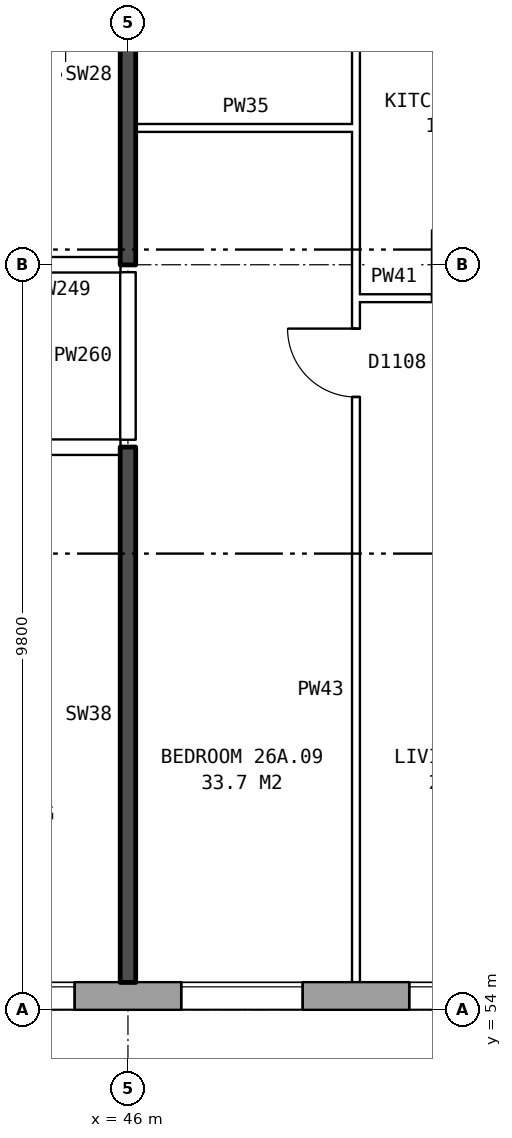
"""IFC4 building model, lengths in metres.
Left out: names, types, materials, properties, quantities, classifications, styles, units other than length and angle.
Written with IfcOpenShell. Run it as: python <this file> out.ifc"""

import sys

from ifc_helpers import new_model, si_unit, direction, frame, frame_2d, origin, place, context, subcontext, project, spatial, rectangle, extrude, element, fill, save


model = new_model("IFC4")
c1 = context("Model", 3, precision=1e-05, world=origin(), true_north=direction((0.0, 1.0)))
c2 = subcontext(c1, "Body", "Model", "MODEL_VIEW")
j1 = project(units=[si_unit("LENGTHUNIT", "METRE"), si_unit("PLANEANGLEUNIT", "RADIAN")], contexts=[c1])
p1 = place(None, origin())
s1 = spatial("IfcSite", under=j1, at=p1, CompositionType="ELEMENT")
p2 = place(p1, origin())
s2 = spatial("IfcBuilding", under=s1, at=p2, CompositionType="ELEMENT")
p3 = place(p2, frame((0.0, 0.0, 96.4)))
s3 = spatial("IfcBuildingStorey", under=s2, at=p3, CompositionType="ELEMENT", Elevation=96.4)
p4 = place(p3, frame((28.075, 54.18, 0.0), z_axis=(0.0, 0.0, 1.0), x_axis=(1.0, 0.0, 0.0)))
e1 = element("IfcWall", 1, at=p4, inside=s3, PredefinedType="STANDARD", context=c2, shape_type="SweptSolid", body=[
    extrude(rectangle(XDim=44.851, YDim=0.36, at=frame_2d((22.425, 0.0))), origin(), (0.0, 0.0, 1.0), 2.85),
])
p5 = place(p4, frame((0.4, 0.0, 0.8)))
e2 = element("IfcOpeningElement", 2, at=p5, cuts=e1, PredefinedType="OPENING", context=c2, shape_type="SweptSolid", body=[
    extrude(rectangle(XDim=0.8, YDim=0.9, at=frame_2d((0.4, 0.45))), frame((0.0, 0.19, 0.0), z_axis=(0.0, -1.0, 0.0), x_axis=(1.0, 0.0, 0.0)), (0.0, 0.0, 1.0), 0.38),
])
p6 = place(p4, frame((3.625, 0.0, 0.8)))
e3 = element("IfcOpeningElement", 3, at=p6, cuts=e1, PredefinedType="OPENING", context=c2, shape_type="SweptSolid", body=[
    extrude(rectangle(XDim=1.6, YDim=1.8, at=frame_2d((0.8, 0.9))), frame((0.0, 0.19, 0.0), z_axis=(0.0, -1.0, 0.0), x_axis=(1.0, 0.0, 0.0)), (0.0, 0.0, 1.0), 0.38),
])
p7 = place(p4, frame((6.625, 0.0, 0.8)))
e4 = element("IfcOpeningElement", 4, at=p7, cuts=e1, PredefinedType="OPENING", context=c2, shape_type="SweptSolid", body=[
    extrude(rectangle(XDim=1.6, YDim=1.8, at=frame_2d((0.8, 0.9))), frame((0.0, 0.19, 0.0), z_axis=(0.0, -1.0, 0.0), x_axis=(1.0, 0.0, 0.0)), (0.0, 0.0, 1.0), 0.38),
])
p8 = place(p4, frame((9.625, 0.0, 0.8)))
e5 = element("IfcOpeningElement", 5, at=p8, cuts=e1, PredefinedType="OPENING", context=c2, shape_type="SweptSolid", body=[
    extrude(rectangle(XDim=1.6, YDim=1.8, at=frame_2d((0.8, 0.9))), frame((0.0, 0.19, 0.0), z_axis=(0.0, -1.0, 0.0), x_axis=(1.0, 0.0, 0.0)), (0.0, 0.0, 1.0), 0.38),
])
p9 = place(p4, frame((12.625, 0.0, 0.8)))
e6 = element("IfcOpeningElement", 6, at=p9, cuts=e1, PredefinedType="OPENING", context=c2, shape_type="SweptSolid", body=[
    extrude(rectangle(XDim=1.6, YDim=1.8, at=frame_2d((0.8, 0.9))), frame((0.0, 0.19, 0.0), z_axis=(0.0, -1.0, 0.0), x_axis=(1.0, 0.0, 0.0)), (0.0, 0.0, 1.0), 0.38),
])
p10 = place(p4, frame((15.625, 0.0, 0.8)))
e7 = element("IfcOpeningElement", 7, at=p10, cuts=e1, PredefinedType="OPENING", context=c2, shape_type="SweptSolid", body=[
    extrude(rectangle(XDim=1.6, YDim=1.8, at=frame_2d((0.8, 0.9))), frame((0.0, 0.19, 0.0), z_axis=(0.0, -1.0, 0.0), x_axis=(1.0, 0.0, 0.0)), (0.0, 0.0, 1.0), 0.38),
])
p11 = place(p4, frame((18.625, 0.0, 0.8)))
e8 = element("IfcOpeningElement", 8, at=p11, cuts=e1, PredefinedType="OPENING", context=c2, shape_type="SweptSolid", body=[
    extrude(rectangle(XDim=1.6, YDim=1.8, at=frame_2d((0.8, 0.9))), frame((0.0, 0.19, 0.0), z_axis=(0.0, -1.0, 0.0), x_axis=(1.0, 0.0, 0.0)), (0.0, 0.0, 1.0), 0.38),
])
p12 = place(p4, frame((21.625, 0.0, 0.8)))
e9 = element("IfcOpeningElement", 9, at=p12, cuts=e1, PredefinedType="OPENING", context=c2, shape_type="SweptSolid", body=[
    extrude(rectangle(XDim=1.6, YDim=1.8, at=frame_2d((0.8, 0.9))), frame((0.0, 0.19, 0.0), z_axis=(0.0, -1.0, 0.0), x_axis=(1.0, 0.0, 0.0)), (0.0, 0.0, 1.0), 0.38),
])
p13 = place(p4, frame((24.625, 0.0, 0.8)))
e10 = element("IfcOpeningElement", 10, at=p13, cuts=e1, PredefinedType="OPENING", context=c2, shape_type="SweptSolid", body=[
    extrude(rectangle(XDim=1.6, YDim=1.8, at=frame_2d((0.8, 0.9))), frame((0.0, 0.19, 0.0), z_axis=(0.0, -1.0, 0.0), x_axis=(1.0, 0.0, 0.0)), (0.0, 0.0, 1.0), 0.38),
])
p14 = place(p4, frame((27.625, 0.0, 0.8)))
e11 = element("IfcOpeningElement", 11, at=p14, cuts=e1, PredefinedType="OPENING", context=c2, shape_type="SweptSolid", body=[
    extrude(rectangle(XDim=1.6, YDim=1.8, at=frame_2d((0.8, 0.9))), frame((0.0, 0.19, 0.0), z_axis=(0.0, -1.0, 0.0), x_axis=(1.0, 0.0, 0.0)), (0.0, 0.0, 1.0), 0.38),
])
p15 = place(p4, frame((30.625, 0.0, 0.8)))
e12 = element("IfcOpeningElement", 12, at=p15, cuts=e1, PredefinedType="OPENING", context=c2, shape_type="SweptSolid", body=[
    extrude(rectangle(XDim=1.6, YDim=1.8, at=frame_2d((0.8, 0.9))), frame((0.0, 0.19, 0.0), z_axis=(0.0, -1.0, 0.0), x_axis=(1.0, 0.0, 0.0)), (0.0, 0.0, 1.0), 0.38),
])
p16 = place(p4, frame((33.625, 0.0, 0.8)))
e13 = element("IfcOpeningElement", 13, at=p16, cuts=e1, PredefinedType="OPENING", context=c2, shape_type="SweptSolid", body=[
    extrude(rectangle(XDim=1.6, YDim=1.8, at=frame_2d((0.8, 0.9))), frame((0.0, 0.19, 0.0), z_axis=(0.0, -1.0, 0.0), x_axis=(1.0, 0.0, 0.0)), (0.0, 0.0, 1.0), 0.38),
])
p17 = place(p4, frame((36.625, 0.0, 0.8)))
e14 = element("IfcOpeningElement", 14, at=p17, cuts=e1, PredefinedType="OPENING", context=c2, shape_type="SweptSolid", body=[
    extrude(rectangle(XDim=1.6, YDim=1.8, at=frame_2d((0.8, 0.9))), frame((0.0, 0.19, 0.0), z_axis=(0.0, -1.0, 0.0), x_axis=(1.0, 0.0, 0.0)), (0.0, 0.0, 1.0), 0.38),
])
p18 = place(p4, frame((39.625, 0.0, 0.8)))
e15 = element("IfcOpeningElement", 15, at=p18, cuts=e1, PredefinedType="OPENING", context=c2, shape_type="SweptSolid", body=[
    extrude(rectangle(XDim=1.6, YDim=1.8, at=frame_2d((0.8, 0.9))), frame((0.0, 0.19, 0.0), z_axis=(0.0, -1.0, 0.0), x_axis=(1.0, 0.0, 0.0)), (0.0, 0.0, 1.0), 0.38),
])
p19 = place(p4, frame((42.125, 0.0, 0.8)))
e16 = element("IfcOpeningElement", 16, at=p19, cuts=e1, PredefinedType="OPENING", context=c2, shape_type="SweptSolid", body=[
    extrude(rectangle(XDim=1.0, YDim=1.8, at=frame_2d((0.5, 0.9))), frame((0.0, 0.19, 0.0), z_axis=(0.0, -1.0, 0.0), x_axis=(1.0, 0.0, 0.0)), (0.0, 0.0, 1.0), 0.38),
])
p20 = place(p4, frame((1.65, 0.0, 0.8)))
e17 = element("IfcOpeningElement", 17, at=p20, cuts=e1, PredefinedType="OPENING", context=c2, shape_type="SweptSolid", body=[
    extrude(rectangle(XDim=1.6, YDim=1.8, at=frame_2d((0.8, 0.9))), frame((0.0, 0.19, 0.0), z_axis=(0.0, -1.0, 0.0), x_axis=(1.0, 0.0, 0.0)), (0.0, 0.0, 1.0), 0.38),
])
p21 = place(p4, frame((43.425, 0.0, 0.8)))
e18 = element("IfcOpeningElement", 18, at=p21, cuts=e1, PredefinedType="OPENING", context=c2, shape_type="SweptSolid", body=[
    extrude(rectangle(XDim=1.0, YDim=0.9, at=frame_2d((0.5, 0.45))), frame((0.0, 0.19, 0.0), z_axis=(0.0, -1.0, 0.0), x_axis=(1.0, 0.0, 0.0)), (0.0, 0.0, 1.0), 0.38),
])
p22 = place(p3, frame((25.36, 61.4, 0.0), z_axis=(0.0, 0.0, 1.0), x_axis=(1.0, 0.0, 0.0)))
e19 = element("IfcWall", 19, at=p22, inside=s3, PredefinedType="PARTITIONING", context=c2, shape_type="SweptSolid", body=[
    extrude(rectangle(XDim=20.54, YDim=0.2, at=frame_2d((10.27, 0.0))), origin(), (0.0, 0.0, 1.0), 2.85),
])
p23 = place(p22, frame((18.09, 0.0, 0.0)))
e20 = element("IfcOpeningElement", 20, at=p23, cuts=e19, PredefinedType="OPENING", context=c2, shape_type="SweptSolid", body=[
    extrude(rectangle(XDim=1.0, YDim=2.1, at=frame_2d((0.5, 1.05))), frame((0.0, 0.11, 0.0), z_axis=(0.0, -1.0, 0.0), x_axis=(1.0, 0.0, 0.0)), (0.0, 0.0, 1.0), 0.22),
])
p24 = place(p22, frame((12.14, 0.0, 0.0)))
e21 = element("IfcOpeningElement", 21, at=p24, cuts=e19, PredefinedType="OPENING", context=c2, shape_type="SweptSolid", body=[
    extrude(rectangle(XDim=1.0, YDim=2.1, at=frame_2d((0.5, 1.05))), frame((0.0, 0.11, 0.0), z_axis=(0.0, -1.0, 0.0), x_axis=(1.0, 0.0, 0.0)), (0.0, 0.0, 1.0), 0.22),
])
p25 = place(p22, frame((2.62, 0.0, 0.0)))
e22 = element("IfcOpeningElement", 22, at=p25, cuts=e19, PredefinedType="OPENING", context=c2, shape_type="SweptSolid", body=[
    extrude(rectangle(XDim=1.0, YDim=2.1, at=frame_2d((0.5, 1.05))), frame((0.0, 0.11, 0.0), z_axis=(0.0, -1.0, 0.0), x_axis=(1.0, 0.0, 0.0)), (0.0, 0.0, 1.0), 0.22),
])
p26 = place(p3, frame((49.0, 63.36, 0.0), z_axis=(0.0, 0.0, 1.0), x_axis=(1.0, 0.0, 0.0)))
e23 = element("IfcWall", 23, at=p26, inside=s3, PredefinedType="PARTITIONING", context=c2, shape_type="SweptSolid", body=[
    extrude(rectangle(XDim=2.9, YDim=0.1, at=frame_2d((1.45, 0.0))), origin(), (0.0, 0.0, 1.0), 2.85),
])
p27 = place(p26, frame((1.0, 0.0, 0.0)))
e24 = element("IfcOpeningElement", 24, at=p27, cuts=e23, PredefinedType="OPENING", context=c2, shape_type="SweptSolid", body=[
    extrude(rectangle(XDim=0.9, YDim=2.1, at=frame_2d((0.45, 1.05))), frame((0.0, 0.06, 0.0), z_axis=(0.0, -1.0, 0.0), x_axis=(1.0, 0.0, 0.0)), (0.0, 0.0, 1.0), 0.12),
])
p28 = place(p3, frame((44.36, 63.8, 0.0), z_axis=(0.0, 0.0, 1.0), x_axis=(1.0, 0.0, 0.0)))
e25 = element("IfcWall", 25, at=p28, inside=s3, PredefinedType="PARTITIONING", context=c2, shape_type="SweptSolid", body=[
    extrude(rectangle(XDim=1.54, YDim=0.2, at=frame_2d((0.77, 0.0))), origin(), (0.0, 0.0, 1.0), 2.85),
])
p29 = place(p3, frame((46.1, 65.6, 0.0), z_axis=(0.0, 0.0, 1.0), x_axis=(1.0, 0.0, 0.0)))
e26 = element("IfcWall", 26, at=p29, inside=s3, PredefinedType="PARTITIONING", context=c2, shape_type="SweptSolid", body=[
    extrude(rectangle(XDim=2.9, YDim=0.1, at=frame_2d((1.45, 0.0))), origin(), (0.0, 0.0, 1.0), 2.85),
])
p30 = place(p3, frame((46.0, 54.36, 0.0), z_axis=(0.0, 0.0, 1.0), x_axis=(0.0, 1.0, 0.0)))
e27 = element("IfcWall", 27, at=p30, inside=s3, PredefinedType="SOLIDWALL", context=c2, shape_type="SweptSolid", body=[
    extrude(rectangle(XDim=7.04, YDim=0.2, at=frame_2d((3.52, 0.0))), origin(), (0.0, 0.0, 1.0), 2.85),
])
p31 = place(p3, frame((46.0, 61.5, 0.0), z_axis=(0.0, 0.0, 1.0), x_axis=(0.0, 1.0, 0.0)))
e28 = element("IfcWall", 28, at=p31, inside=s3, PredefinedType="PARTITIONING", context=c2, shape_type="SweptSolid", body=[
    extrude(rectangle(XDim=2.2, YDim=0.2, at=frame_2d((1.1, 0.0))), origin(), (0.0, 0.0, 1.0), 2.85),
])
p32 = place(p3, frame((46.0, 63.8, 0.0), z_axis=(0.0, 0.0, 1.0), x_axis=(0.0, 1.0, 0.0)))
e29 = element("IfcWall", 29, at=p32, inside=s3, PredefinedType="SOLIDWALL", context=c2, shape_type="SweptSolid", body=[
    extrude(rectangle(XDim=5.0, YDim=0.2, at=frame_2d((2.5, 0.0))), origin(), (0.0, 0.0, 1.0), 2.85),
])
p33 = place(p3, frame((49.0, 54.36, 0.0), z_axis=(0.0, 0.0, 1.0), x_axis=(0.0, 1.0, 0.0)))
e30 = element("IfcWall", 30, at=p33, inside=s3, PredefinedType="PARTITIONING", context=c2, shape_type="SweptSolid", body=[
    extrude(rectangle(XDim=14.34, YDim=0.1, at=frame_2d((7.17, 0.0))), origin(), (0.0, 0.0, 1.0), 2.85),
])
p34 = place(p33, frame((7.7, 0.0, 0.0)))
e31 = element("IfcOpeningElement", 31, at=p34, cuts=e30, PredefinedType="OPENING", context=c2, shape_type="SweptSolid", body=[
    extrude(rectangle(XDim=0.9, YDim=2.1, at=frame_2d((0.45, 1.05))), frame((0.0, 0.06, 0.0), z_axis=(0.0, -1.0, 0.0), x_axis=(1.0, 0.0, 0.0)), (0.0, 0.0, 1.0), 0.12),
])
p35 = place(p33, frame((13.04, 0.0, 0.0)))
e32 = element("IfcOpeningElement", 32, at=p35, cuts=e30, PredefinedType="OPENING", context=c2, shape_type="SweptSolid", body=[
    extrude(rectangle(XDim=0.9, YDim=2.1, at=frame_2d((0.45, 1.05))), frame((0.0, 0.06, 0.0), z_axis=(0.0, -1.0, 0.0), x_axis=(1.0, 0.0, 0.0)), (0.0, 0.0, 1.0), 0.12),
])
p36 = place(p10, origin())
e33 = element("IfcWindow", 33, at=p36, inside=s3, PartitioningType="SINGLE_PANEL", PredefinedType="WINDOW", context=c2, shape_type="SweptSolid", body=[
    extrude(rectangle(XDim=1.6, YDim=1.8, at=frame_2d((0.8, 0.9))), frame((0.0, 0.15, 0.0), z_axis=(0.0, -1.0, 0.0), x_axis=(1.0, 0.0, 0.0)), (0.0, 0.0, 1.0), 0.06),
])
fill(e7, e33)
p37 = place(p11, origin())
e34 = element("IfcWindow", 34, at=p37, inside=s3, PartitioningType="SINGLE_PANEL", PredefinedType="WINDOW", context=c2, shape_type="SweptSolid", body=[
    extrude(rectangle(XDim=1.6, YDim=1.8, at=frame_2d((0.8, 0.9))), frame((0.0, 0.15, 0.0), z_axis=(0.0, -1.0, 0.0), x_axis=(1.0, 0.0, 0.0)), (0.0, 0.0, 1.0), 0.06),
])
fill(e8, e34)
p38 = place(p12, origin())
e35 = element("IfcWindow", 35, at=p38, inside=s3, PartitioningType="SINGLE_PANEL", PredefinedType="WINDOW", context=c2, shape_type="SweptSolid", body=[
    extrude(rectangle(XDim=1.6, YDim=1.8, at=frame_2d((0.8, 0.9))), frame((0.0, 0.15, 0.0), z_axis=(0.0, -1.0, 0.0), x_axis=(1.0, 0.0, 0.0)), (0.0, 0.0, 1.0), 0.06),
])
fill(e9, e35)
p39 = place(p34, origin())
e36 = element("IfcDoor", 36, at=p39, inside=s3, OperationType="SINGLE_SWING_RIGHT", PredefinedType="DOOR", context=c2, shape_type="SweptSolid", body=[
    extrude(rectangle(XDim=0.9, YDim=2.1, at=frame_2d((0.45, 1.05))), frame((0.0, 0.025, 0.0), z_axis=(0.0, -1.0, 0.0), x_axis=(1.0, 0.0, 0.0)), (0.0, 0.0, 1.0), 0.05),
])
fill(e31, e36)
save(model, sys.argv[1])
